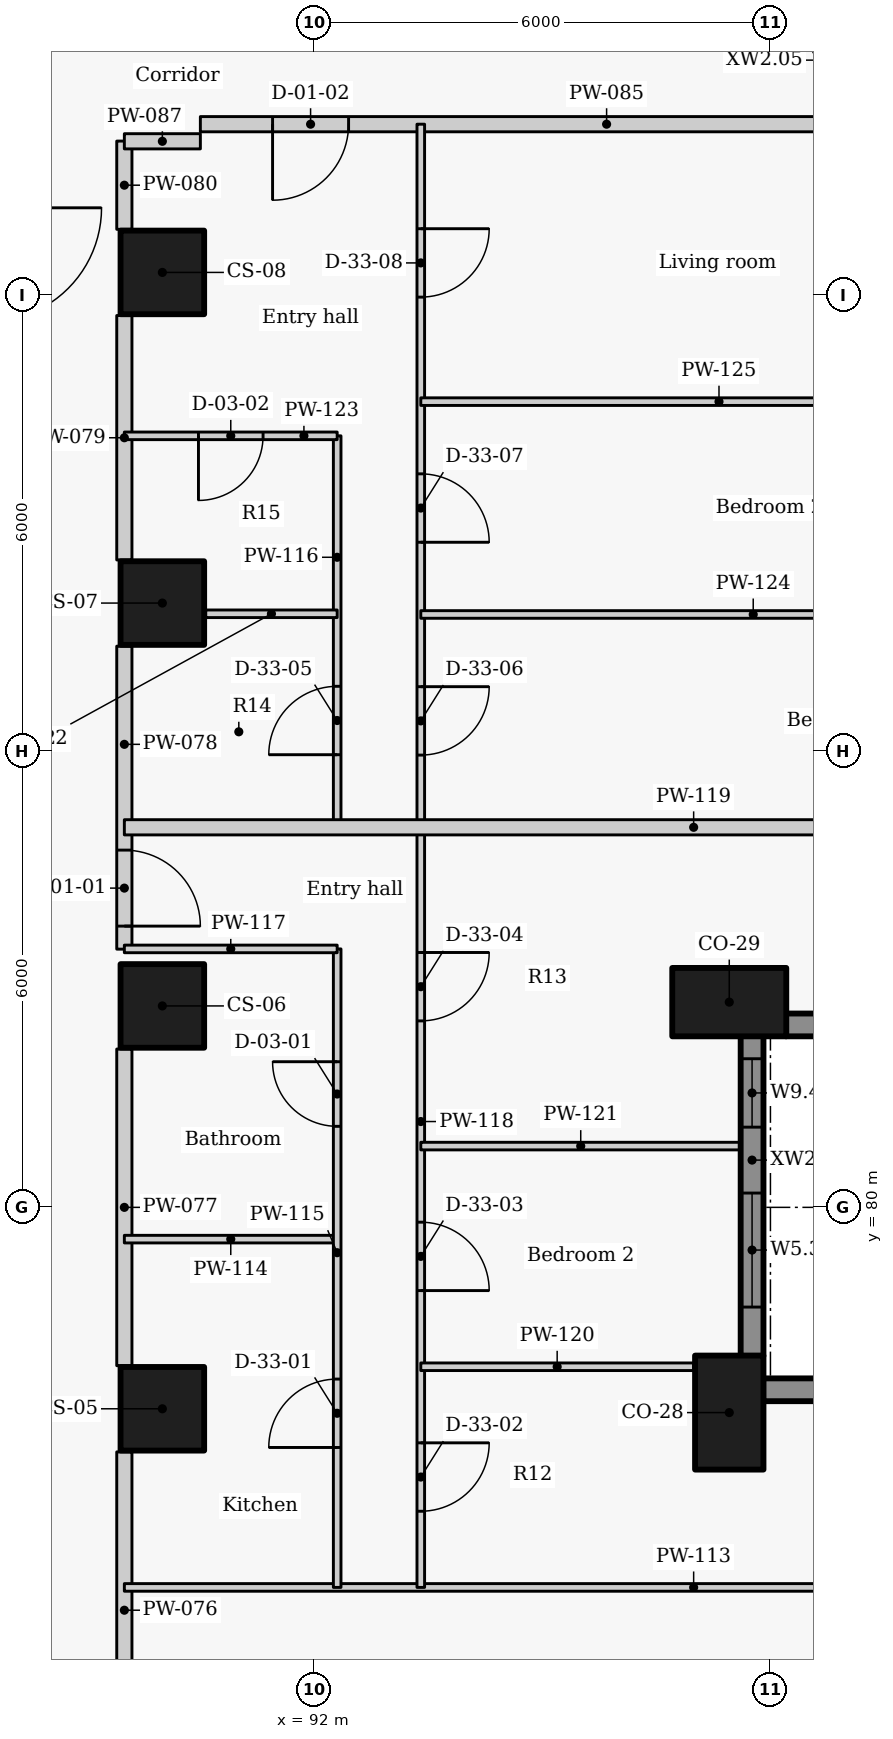
"""IFC4 building model, lengths in metres.
Left out: names, types, materials, properties, quantities, classifications, styles, units other than length and angle.
Written with IfcOpenShell. Run it as: python <this file> out.ifc"""

import sys

from ifc_helpers import new_model, si_unit, direction, frame, frame_2d, origin, origin_2d, place, context, subcontext, project, spatial, rectangle, extrude, element, fill, save


model = new_model("IFC4")
c1 = context("Model", 3, precision=1e-05, world=origin(), true_north=direction((0.0, 1.0)))
c2 = subcontext(c1, "Body", "Model", "MODEL_VIEW")
j1 = project(units=[si_unit("LENGTHUNIT", "METRE"), si_unit("PLANEANGLEUNIT", "RADIAN")], contexts=[c1])
p1 = place(None, origin())
s1 = spatial("IfcSite", under=j1, at=p1, CompositionType="ELEMENT")
p2 = place(p1, origin())
s2 = spatial("IfcBuilding", under=s1, at=p2, CompositionType="ELEMENT")
p3 = place(p2, frame((0.0, 0.0, 61.2)))
s3 = spatial("IfcBuildingStorey", under=s2, at=p3, CompositionType="ELEMENT", Elevation=61.2)
for number, where, z_axis, x_axis in (
    (1, (97.458, 77.3, 0.0), (0.0, 0.0, 1.0), (0.0, 1.0, 0.0)),
    (2, (97.458, 82.7, 0.0), (0.0, 0.0, 1.0), (1.0, 0.0, 0.0)),
):
    element("IfcColumn", number, at=place(p3, frame(where, z_axis=z_axis, x_axis=x_axis)), inside=s3, PredefinedType="COLUMN", context=c2, shape_type="SweptSolid", body=[
        extrude(rectangle(XDim=1.5, YDim=0.9, at=origin_2d()), origin(), (0.0, 0.0, 1.0), 3.3),
    ])
for number, where, z_axis, x_axis in (
    (3, (90.0, 77.35, 0.0), (0.0, 0.0, 1.0), (0.0, 1.0, 0.0)),
    (4, (90.0, 82.65, 0.0), (0.0, 0.0, 1.0), (0.0, 1.0, 0.0)),
    (5, (90.0, 87.95, 0.0), (0.0, 0.0, 1.0), (0.0, 1.0, 0.0)),
    (6, (90.0, 92.3, 0.0), (0.0, 0.0, 1.0), (0.0, 1.0, 0.0)),
):
    element("IfcColumn", number, at=place(p3, frame(where, z_axis=z_axis, x_axis=x_axis)), inside=s3, PredefinedType="COLUMN", context=c2, shape_type="SweptSolid", body=[
        extrude(rectangle(XDim=1.1, YDim=1.1, at=origin_2d()), origin(), (0.0, 0.0, 1.0), 3.3),
    ])
p4 = place(p3, frame((98.204, 82.4, 0.0), z_axis=(0.0, 0.0, 1.0), x_axis=(1.0, 0.0, 0.0)))
e7 = element("IfcWall", 7, at=p4, inside=s3, PredefinedType="SOLIDWALL", context=c2, shape_type="SweptSolid", body=[
    extrude(rectangle(XDim=3.873, YDim=0.3, at=frame_2d((1.936, 0.0))), origin(), (0.0, 0.0, 1.0), 2.425),
])
p5 = place(p4, frame((0.886, 0.0, 0.9)))
e8 = element("IfcOpeningElement", 8, at=p5, cuts=e7, PredefinedType="OPENING", context=c2, shape_type="SweptSolid", body=[
    extrude(rectangle(XDim=2.1, YDim=1.1, at=frame_2d((1.05, 0.55))), frame((0.0, 0.16, 0.0), z_axis=(0.0, -1.0, 0.0), x_axis=(1.0, 0.0, 0.0)), (0.0, 0.0, 1.0), 0.32),
])
p6 = place(p3, frame((100.195, 92.721, 0.0), z_axis=(0.0, 0.0, 1.0), x_axis=(-0.500001735503, 0.866024401789, 0.0)))
e9 = element("IfcWall", 9, at=p6, inside=s3, PredefinedType="SOLIDWALL", context=c2, shape_type="SweptSolid", body=[
    extrude(rectangle(XDim=3.834, YDim=0.3, at=frame_2d((1.917, 0.0))), origin(), (0.0, 0.0, 1.0), 2.425),
])
p7 = place(p6, frame((0.344, 0.0, 0.0)))
e10 = element("IfcOpeningElement", 10, at=p7, cuts=e9, PredefinedType="OPENING", context=c2, shape_type="SweptSolid", body=[
    extrude(rectangle(XDim=1.2, YDim=2.0, at=frame_2d((0.6, 1.0))), frame((0.0, 0.16, 0.0), z_axis=(0.0, -1.0, 0.0), x_axis=(1.0, 0.0, 0.0)), (0.0, 0.0, 1.0), 0.32),
])
p8 = place(p3, frame((102.077, 77.6, 0.0), z_axis=(0.0, 0.0, 1.0), x_axis=(-1.0, 0.0, 0.0)))
e11 = element("IfcWall", 11, at=p8, inside=s3, PredefinedType="SOLIDWALL", context=c2, shape_type="SweptSolid", body=[
    extrude(rectangle(XDim=4.173, YDim=0.3, at=frame_2d((2.086, 0.0))), origin(), (0.0, 0.0, 1.0), 2.425),
])
p9 = place(p8, frame((1.336, 0.0, 0.9)))
e12 = element("IfcOpeningElement", 12, at=p9, cuts=e11, PredefinedType="OPENING", context=c2, shape_type="SweptSolid", body=[
    extrude(rectangle(XDim=1.5, YDim=1.1, at=frame_2d((0.75, 0.55))), frame((0.0, 0.16, 0.0), z_axis=(0.0, -1.0, 0.0), x_axis=(1.0, 0.0, 0.0)), (0.0, 0.0, 1.0), 0.32),
])
p10 = place(p3, frame((97.758, 78.046, 0.0), z_axis=(0.0, 0.0, 1.0), x_axis=(0.0, 1.0, 0.0)))
e13 = element("IfcWall", 13, at=p10, inside=s3, PredefinedType="SOLIDWALL", context=c2, shape_type="SweptSolid", body=[
    extrude(rectangle(XDim=4.208, YDim=0.3, at=frame_2d((2.104, 0.0))), origin(), (0.0, 0.0, 1.0), 2.425),
])
p11 = place(p10, frame((0.642, 0.0, 0.9)))
e14 = element("IfcOpeningElement", 14, at=p11, cuts=e13, PredefinedType="OPENING", context=c2, shape_type="SweptSolid", body=[
    extrude(rectangle(XDim=1.5, YDim=1.1, at=frame_2d((0.75, 0.55))), frame((0.0, 0.16, 0.0), z_axis=(0.0, -1.0, 0.0), x_axis=(1.0, 0.0, 0.0)), (0.0, 0.0, 1.0), 0.32),
])
p12 = place(p10, frame((3.009, 0.0, 0.9)))
e15 = element("IfcOpeningElement", 15, at=p12, cuts=e13, PredefinedType="OPENING", context=c2, shape_type="SweptSolid", body=[
    extrude(rectangle(XDim=0.9, YDim=1.1, at=frame_2d((0.45, 0.55))), frame((0.0, 0.16, 0.0), z_axis=(0.0, -1.0, 0.0), x_axis=(1.0, 0.0, 0.0)), (0.0, 0.0, 1.0), 0.32),
])
for number, where, z_axis, x_axis in (
    (16, (89.5, 72.617, 0.0), (0.0, 0.0, 1.0), (0.0, 1.0, 0.0)),
    (17, (89.5, 77.917, 0.0), (0.0, 0.0, 1.0), (0.0, 1.0, 0.0)),
):
    element("IfcWall", number, at=place(p3, frame(where, z_axis=z_axis, x_axis=x_axis)), inside=s3, PredefinedType="PARTITIONING", context=c2, shape_type="SweptSolid", body=[
        extrude(rectangle(XDim=4.166, YDim=0.2, at=frame_2d((2.083, 0.0))), origin(), (0.0, 0.0, 1.0), 3.025),
    ])
p13 = place(p3, frame((89.5, 87.383, 0.0), z_axis=(0.0, 0.0, 1.0), x_axis=(0.0, -1.0, 0.0)))
e18 = element("IfcWall", 18, at=p13, inside=s3, PredefinedType="PARTITIONING", context=c2, shape_type="SweptSolid", body=[
    extrude(rectangle(XDim=3.986, YDim=0.2, at=frame_2d((1.993, 0.0))), origin(), (0.0, 0.0, 1.0), 3.025),
])
p14 = place(p13, frame((2.683, 0.0, 0.0)))
e19 = element("IfcOpeningElement", 19, at=p14, cuts=e18, PredefinedType="OPENING", context=c2, shape_type="SweptSolid", body=[
    extrude(rectangle(XDim=1.0, YDim=2.1, at=frame_2d((0.5, 1.05))), frame((0.0, 0.11, 0.0), z_axis=(0.0, -1.0, 0.0), x_axis=(1.0, 0.0, 0.0)), (0.0, 0.0, 1.0), 0.22),
])
p15 = place(p3, frame((89.5, 88.517, 0.0), z_axis=(0.0, 0.0, 1.0), x_axis=(0.0, 1.0, 0.0)))
e20 = element("IfcWall", 20, at=p15, inside=s3, PredefinedType="PARTITIONING", context=c2, shape_type="SweptSolid", body=[
    extrude(rectangle(XDim=3.216, YDim=0.2, at=frame_2d((1.608, 0.0))), origin(), (0.0, 0.0, 1.0), 3.025),
])
p16 = place(p3, frame((89.5, 92.867, 0.0), z_axis=(0.0, 0.0, 1.0), x_axis=(0.0, 1.0, 0.0)))
e21 = element("IfcWall", 21, at=p16, inside=s3, PredefinedType="PARTITIONING", context=c2, shape_type="SweptSolid", body=[
    extrude(rectangle(XDim=1.161, YDim=0.2, at=frame_2d((0.581, 0.0))), origin(), (0.0, 0.0, 1.0), 3.025),
])
p17 = place(p3, frame((99.139, 94.25, 0.0), z_axis=(0.0, 0.0, 1.0), x_axis=(-1.0, 0.0, 0.0)))
e22 = element("IfcWall", 22, at=p17, inside=s3, PredefinedType="PARTITIONING", context=c2, shape_type="SweptSolid", body=[
    extrude(rectangle(XDim=8.639, YDim=0.2, at=frame_2d((4.32, 0.0))), origin(), (0.0, 0.0, 1.0), 2.405),
])
p18 = place(p17, frame((6.689, 0.0, 0.0)))
e23 = element("IfcOpeningElement", 23, at=p18, cuts=e22, PredefinedType="OPENING", context=c2, shape_type="SweptSolid", body=[
    extrude(rectangle(XDim=1.0, YDim=2.1, at=frame_2d((0.5, 1.05))), frame((0.0, 0.11, 0.0), z_axis=(0.0, -1.0, 0.0), x_axis=(1.0, 0.0, 0.0)), (0.0, 0.0, 1.0), 0.22),
])
p19 = place(p3, frame((89.5, 94.025, 0.0), z_axis=(0.0, 0.0, 1.0), x_axis=(1.0, 0.0, 0.0)))
e24 = element("IfcWall", 24, at=p19, inside=s3, PredefinedType="PARTITIONING", context=c2, shape_type="SweptSolid", body=[
    extrude(rectangle(XDim=1.0, YDim=0.2, at=frame_2d((0.5, 0.0))), origin(), (0.0, 0.0, 1.0), 2.505),
])
p20 = place(p3, frame((89.5, 75.0, 0.0), z_axis=(0.0, 0.0, 1.0), x_axis=(1.0, 0.0, 0.0)))
e25 = element("IfcWall", 25, at=p20, inside=s3, PredefinedType="PARTITIONING", context=c2, shape_type="SweptSolid", body=[
    extrude(rectangle(XDim=14.979, YDim=0.1, at=frame_2d((7.49, 0.0))), origin(), (0.0, 0.0, 1.0), 2.405),
])
p21 = place(p3, frame((89.5, 79.582, 0.0), z_axis=(0.0, 0.0, 1.0), x_axis=(1.0, 0.0, 0.0)))
e26 = element("IfcWall", 26, at=p21, inside=s3, PredefinedType="PARTITIONING", context=c2, shape_type="SweptSolid", body=[
    extrude(rectangle(XDim=2.8, YDim=0.1, at=frame_2d((1.4, 0.0))), origin(), (0.0, 0.0, 1.0), 2.505),
])
p22 = place(p3, frame((92.3, 75.0, 0.0), z_axis=(0.0, 0.0, 1.0), x_axis=(0.0, 1.0, 0.0)))
e27 = element("IfcWall", 27, at=p22, inside=s3, PredefinedType="PARTITIONING", context=c2, shape_type="SweptSolid", body=[
    extrude(rectangle(XDim=8.4, YDim=0.1, at=frame_2d((4.2, 0.0))), origin(), (0.0, 0.0, 1.0), 3.025),
])
p23 = place(p22, frame((1.841, 0.0, 0.0)))
e28 = element("IfcOpeningElement", 28, at=p23, cuts=e27, PredefinedType="OPENING", context=c2, shape_type="SweptSolid", body=[
    extrude(rectangle(XDim=0.9, YDim=2.1, at=frame_2d((0.45, 1.05))), frame((0.0, 0.06, 0.0), z_axis=(0.0, -1.0, 0.0), x_axis=(1.0, 0.0, 0.0)), (0.0, 0.0, 1.0), 0.12),
])
p24 = place(p22, frame((6.066, 0.0, 0.0)))
e29 = element("IfcOpeningElement", 29, at=p24, cuts=e27, PredefinedType="OPENING", context=c2, shape_type="SweptSolid", body=[
    extrude(rectangle(XDim=0.85, YDim=2.1, at=frame_2d((0.425, 1.05))), frame((0.0, 0.06, 0.0), z_axis=(0.0, -1.0, 0.0), x_axis=(1.0, 0.0, 0.0)), (0.0, 0.0, 1.0), 0.12),
])
p25 = place(p3, frame((92.3, 85.0, 0.0), z_axis=(0.0, 0.0, 1.0), x_axis=(0.0, 1.0, 0.0)))
e30 = element("IfcWall", 30, at=p25, inside=s3, PredefinedType="PARTITIONING", context=c2, shape_type="SweptSolid", body=[
    extrude(rectangle(XDim=5.15, YDim=0.1, at=frame_2d((2.575, 0.0))), origin(), (0.0, 0.0, 1.0), 3.025),
])
p26 = place(p25, frame((0.955, 0.0, 0.0)))
e31 = element("IfcOpeningElement", 31, at=p26, cuts=e30, PredefinedType="OPENING", context=c2, shape_type="SweptSolid", body=[
    extrude(rectangle(XDim=0.9, YDim=2.1, at=frame_2d((0.45, 1.05))), frame((0.0, 0.06, 0.0), z_axis=(0.0, -1.0, 0.0), x_axis=(1.0, 0.0, 0.0)), (0.0, 0.0, 1.0), 0.12),
])
p27 = place(p3, frame((89.5, 83.4, 0.0), z_axis=(0.0, 0.0, 1.0), x_axis=(1.0, 0.0, 0.0)))
e32 = element("IfcWall", 32, at=p27, inside=s3, PredefinedType="PARTITIONING", context=c2, shape_type="SweptSolid", body=[
    extrude(rectangle(XDim=2.8, YDim=0.1, at=frame_2d((1.4, 0.0))), origin(), (0.0, 0.0, 1.0), 2.505),
])
p28 = place(p3, frame((93.4, 94.25, 0.0), z_axis=(0.0, 0.0, 1.0), x_axis=(0.0, -1.0, 0.0)))
e33 = element("IfcWall", 33, at=p28, inside=s3, PredefinedType="PARTITIONING", context=c2, shape_type="SweptSolid", body=[
    extrude(rectangle(XDim=19.25, YDim=0.1, at=frame_2d((9.625, 0.0))), origin(), (0.0, 0.0, 1.0), 3.025),
])
p29 = place(p28, frame((17.348, 0.0, 0.0)))
e34 = element("IfcOpeningElement", 34, at=p29, cuts=e33, PredefinedType="OPENING", context=c2, shape_type="SweptSolid", body=[
    extrude(rectangle(XDim=0.9, YDim=2.1, at=frame_2d((0.45, 1.05))), frame((0.0, 0.06, 0.0), z_axis=(0.0, -1.0, 0.0), x_axis=(1.0, 0.0, 0.0)), (0.0, 0.0, 1.0), 0.12),
])
p30 = place(p28, frame((14.445, 0.0, 0.0)))
e35 = element("IfcOpeningElement", 35, at=p30, cuts=e33, PredefinedType="OPENING", context=c2, shape_type="SweptSolid", body=[
    extrude(rectangle(XDim=0.9, YDim=2.1, at=frame_2d((0.45, 1.05))), frame((0.0, 0.06, 0.0), z_axis=(0.0, -1.0, 0.0), x_axis=(1.0, 0.0, 0.0)), (0.0, 0.0, 1.0), 0.12),
])
p31 = place(p28, frame((10.897, 0.0, 0.0)))
e36 = element("IfcOpeningElement", 36, at=p31, cuts=e33, PredefinedType="OPENING", context=c2, shape_type="SweptSolid", body=[
    extrude(rectangle(XDim=0.9, YDim=2.1, at=frame_2d((0.45, 1.05))), frame((0.0, 0.06, 0.0), z_axis=(0.0, -1.0, 0.0), x_axis=(1.0, 0.0, 0.0)), (0.0, 0.0, 1.0), 0.12),
])
p32 = place(p28, frame((7.4, 0.0, 0.0)))
e37 = element("IfcOpeningElement", 37, at=p32, cuts=e33, PredefinedType="OPENING", context=c2, shape_type="SweptSolid", body=[
    extrude(rectangle(XDim=0.9, YDim=2.1, at=frame_2d((0.45, 1.05))), frame((0.0, 0.06, 0.0), z_axis=(0.0, -1.0, 0.0), x_axis=(1.0, 0.0, 0.0)), (0.0, 0.0, 1.0), 0.12),
])
p33 = place(p28, frame((4.6, 0.0, 0.0)))
e38 = element("IfcOpeningElement", 38, at=p33, cuts=e33, PredefinedType="OPENING", context=c2, shape_type="SweptSolid", body=[
    extrude(rectangle(XDim=0.9, YDim=2.1, at=frame_2d((0.45, 1.05))), frame((0.0, 0.06, 0.0), z_axis=(0.0, -1.0, 0.0), x_axis=(1.0, 0.0, 0.0)), (0.0, 0.0, 1.0), 0.12),
])
p34 = place(p28, frame((1.375, 0.0, 0.0)))
e39 = element("IfcOpeningElement", 39, at=p34, cuts=e33, PredefinedType="OPENING", context=c2, shape_type="SweptSolid", body=[
    extrude(rectangle(XDim=0.9, YDim=2.1, at=frame_2d((0.45, 1.05))), frame((0.0, 0.06, 0.0), z_axis=(0.0, -1.0, 0.0), x_axis=(1.0, 0.0, 0.0)), (0.0, 0.0, 1.0), 0.12),
])
p35 = place(p3, frame((89.5, 85.0, 0.0), z_axis=(0.0, 0.0, 1.0), x_axis=(1.0, 0.0, 0.0)))
e40 = element("IfcWall", 40, at=p35, inside=s3, PredefinedType="PARTITIONING", context=c2, shape_type="SweptSolid", body=[
    extrude(rectangle(XDim=14.979, YDim=0.2, at=frame_2d((7.49, 0.0))), origin(), (0.0, 0.0, 1.0), 2.405),
])
p36 = place(p3, frame((93.4, 77.903, 0.0), z_axis=(0.0, 0.0, 1.0), x_axis=(1.0, 0.0, 0.0)))
e41 = element("IfcWall", 41, at=p36, inside=s3, PredefinedType="PARTITIONING", context=c2, shape_type="SweptSolid", body=[
    extrude(rectangle(XDim=3.588, YDim=0.1, at=frame_2d((1.794, 0.0))), origin(), (0.0, 0.0, 1.0), 3.025),
])
p37 = place(p3, frame((93.4, 80.806, 0.0), z_axis=(0.0, 0.0, 1.0), x_axis=(1.0, 0.0, 0.0)))
e42 = element("IfcWall", 42, at=p37, inside=s3, PredefinedType="PARTITIONING", context=c2, shape_type="SweptSolid", body=[
    extrude(rectangle(XDim=4.208, YDim=0.1, at=frame_2d((2.104, 0.0))), origin(), (0.0, 0.0, 1.0), 2.405),
])
p38 = place(p3, frame((90.57, 87.809, 0.0), z_axis=(0.0, 0.0, 1.0), x_axis=(1.0, 0.0, 0.0)))
e43 = element("IfcWall", 43, at=p38, inside=s3, PredefinedType="PARTITIONING", context=c2, shape_type="SweptSolid", body=[
    extrude(rectangle(XDim=1.73, YDim=0.1, at=frame_2d((0.865, 0.0))), origin(), (0.0, 0.0, 1.0), 3.025),
])
p39 = place(p3, frame((92.3, 90.15, 0.0), z_axis=(0.0, 0.0, 1.0), x_axis=(-1.0, 0.0, 0.0)))
e44 = element("IfcWall", 44, at=p39, inside=s3, PredefinedType="PARTITIONING", context=c2, shape_type="SweptSolid", body=[
    extrude(rectangle(XDim=2.8, YDim=0.1, at=frame_2d((1.4, 0.0))), origin(), (0.0, 0.0, 1.0), 2.505),
])
p40 = place(p39, frame((0.975, 0.0, 0.0)))
e45 = element("IfcOpeningElement", 45, at=p40, cuts=e44, PredefinedType="OPENING", context=c2, shape_type="SweptSolid", body=[
    extrude(rectangle(XDim=0.85, YDim=2.1, at=frame_2d((0.425, 1.05))), frame((0.0, 0.06, 0.0), z_axis=(0.0, -1.0, 0.0), x_axis=(1.0, 0.0, 0.0)), (0.0, 0.0, 1.0), 0.12),
])
p41 = place(p3, frame((93.4, 87.8, 0.0), z_axis=(0.0, 0.0, 1.0), x_axis=(1.0, 0.0, 0.0)))
e46 = element("IfcWall", 46, at=p41, inside=s3, PredefinedType="PARTITIONING", context=c2, shape_type="SweptSolid", body=[
    extrude(rectangle(XDim=8.747, YDim=0.1, at=frame_2d((4.374, 0.0))), origin(), (0.0, 0.0, 1.0), 3.025),
])
p42 = place(p3, frame((93.4, 90.6, 0.0), z_axis=(0.0, 0.0, 1.0), x_axis=(1.0, 0.0, 0.0)))
e47 = element("IfcWall", 47, at=p42, inside=s3, PredefinedType="PARTITIONING", context=c2, shape_type="SweptSolid", body=[
    extrude(rectangle(XDim=7.846, YDim=0.1, at=frame_2d((3.923, 0.0))), origin(), (0.0, 0.0, 1.0), 2.405),
])
p43 = place(p11, origin())
e48 = element("IfcWindow", 48, at=p43, inside=s3, PartitioningType="SINGLE_PANEL", PredefinedType="WINDOW", context=c2, shape_type="SweptSolid", body=[
    extrude(rectangle(XDim=1.5, YDim=1.1, at=frame_2d((0.75, 0.55))), frame((0.0, 0.03, 0.0), z_axis=(0.0, -1.0, 0.0), x_axis=(1.0, 0.0, 0.0)), (0.0, 0.0, 1.0), 0.06),
])
fill(e14, e48)
p44 = place(p12, origin())
e49 = element("IfcWindow", 49, at=p44, inside=s3, PartitioningType="SINGLE_PANEL", PredefinedType="WINDOW", context=c2, shape_type="SweptSolid", body=[
    extrude(rectangle(XDim=0.9, YDim=1.1, at=frame_2d((0.45, 0.55))), frame((0.0, 0.03, 0.0), z_axis=(0.0, -1.0, 0.0), x_axis=(1.0, 0.0, 0.0)), (0.0, 0.0, 1.0), 0.06),
])
fill(e15, e49)
p45 = place(p14, origin())
e50 = element("IfcDoor", 50, at=p45, inside=s3, OperationType="SINGLE_SWING_RIGHT", PredefinedType="DOOR", context=c2, shape_type="SweptSolid", body=[
    extrude(rectangle(XDim=1.0, YDim=2.1, at=frame_2d((0.5, 1.05))), frame((0.0, 0.025, 0.0), z_axis=(0.0, -1.0, 0.0), x_axis=(1.0, 0.0, 0.0)), (0.0, 0.0, 1.0), 0.05),
])
fill(e19, e50)
p46 = place(p23, origin())
e51 = element("IfcDoor", 51, at=p46, inside=s3, OperationType="SINGLE_SWING_LEFT", PredefinedType="DOOR", context=c2, shape_type="SweptSolid", body=[
    extrude(rectangle(XDim=0.9, YDim=2.1, at=frame_2d((0.45, 1.05))), frame((0.0, 0.025, 0.0), z_axis=(0.0, -1.0, 0.0), x_axis=(1.0, 0.0, 0.0)), (0.0, 0.0, 1.0), 0.05),
])
fill(e28, e51)
p47 = place(p24, origin())
e52 = element("IfcDoor", 52, at=p47, inside=s3, OperationType="SINGLE_SWING_RIGHT", PredefinedType="DOOR", context=c2, shape_type="SweptSolid", body=[
    extrude(rectangle(XDim=0.85, YDim=2.1, at=frame_2d((0.425, 1.05))), frame((0.0, 0.025, 0.0), z_axis=(0.0, -1.0, 0.0), x_axis=(1.0, 0.0, 0.0)), (0.0, 0.0, 1.0), 0.05),
])
fill(e29, e52)
p48 = place(p29, origin())
e53 = element("IfcDoor", 53, at=p48, inside=s3, OperationType="SINGLE_SWING_LEFT", PredefinedType="DOOR", context=c2, shape_type="SweptSolid", body=[
    extrude(rectangle(XDim=0.9, YDim=2.1, at=frame_2d((0.45, 1.05))), frame((0.0, 0.025, 0.0), z_axis=(0.0, -1.0, 0.0), x_axis=(1.0, 0.0, 0.0)), (0.0, 0.0, 1.0), 0.05),
])
fill(e34, e53)
p49 = place(p30, origin())
e54 = element("IfcDoor", 54, at=p49, inside=s3, OperationType="SINGLE_SWING_RIGHT", PredefinedType="DOOR", context=c2, shape_type="SweptSolid", body=[
    extrude(rectangle(XDim=0.9, YDim=2.1, at=frame_2d((0.45, 1.05))), frame((0.0, 0.025, 0.0), z_axis=(0.0, -1.0, 0.0), x_axis=(1.0, 0.0, 0.0)), (0.0, 0.0, 1.0), 0.05),
])
fill(e35, e54)
p50 = place(p31, origin())
e55 = element("IfcDoor", 55, at=p50, inside=s3, OperationType="SINGLE_SWING_LEFT", PredefinedType="DOOR", context=c2, shape_type="SweptSolid", body=[
    extrude(rectangle(XDim=0.9, YDim=2.1, at=frame_2d((0.45, 1.05))), frame((0.0, 0.025, 0.0), z_axis=(0.0, -1.0, 0.0), x_axis=(1.0, 0.0, 0.0)), (0.0, 0.0, 1.0), 0.05),
])
fill(e36, e55)
p51 = place(p18, origin())
e56 = element("IfcDoor", 56, at=p51, inside=s3, OperationType="SINGLE_SWING_RIGHT", PredefinedType="DOOR", context=c2, shape_type="SweptSolid", body=[
    extrude(rectangle(XDim=1.0, YDim=2.1, at=frame_2d((0.5, 1.05))), frame((0.0, 0.025, 0.0), z_axis=(0.0, -1.0, 0.0), x_axis=(1.0, 0.0, 0.0)), (0.0, 0.0, 1.0), 0.05),
])
fill(e23, e56)
p52 = place(p26, origin())
e57 = element("IfcDoor", 57, at=p52, inside=s3, OperationType="SINGLE_SWING_LEFT", PredefinedType="DOOR", context=c2, shape_type="SweptSolid", body=[
    extrude(rectangle(XDim=0.9, YDim=2.1, at=frame_2d((0.45, 1.05))), frame((0.0, 0.025, 0.0), z_axis=(0.0, -1.0, 0.0), x_axis=(1.0, 0.0, 0.0)), (0.0, 0.0, 1.0), 0.05),
])
fill(e31, e57)
p53 = place(p40, origin())
e58 = element("IfcDoor", 58, at=p53, inside=s3, OperationType="SINGLE_SWING_RIGHT", PredefinedType="DOOR", context=c2, shape_type="SweptSolid", body=[
    extrude(rectangle(XDim=0.85, YDim=2.1, at=frame_2d((0.425, 1.05))), frame((0.0, 0.025, 0.0), z_axis=(0.0, -1.0, 0.0), x_axis=(1.0, 0.0, 0.0)), (0.0, 0.0, 1.0), 0.05),
])
fill(e45, e58)
p54 = place(p32, origin())
e59 = element("IfcDoor", 59, at=p54, inside=s3, OperationType="SINGLE_SWING_LEFT", PredefinedType="DOOR", context=c2, shape_type="SweptSolid", body=[
    extrude(rectangle(XDim=0.9, YDim=2.1, at=frame_2d((0.45, 1.05))), frame((0.0, 0.025, 0.0), z_axis=(0.0, -1.0, 0.0), x_axis=(1.0, 0.0, 0.0)), (0.0, 0.0, 1.0), 0.05),
])
fill(e37, e59)
p55 = place(p33, origin())
e60 = element("IfcDoor", 60, at=p55, inside=s3, OperationType="SINGLE_SWING_RIGHT", PredefinedType="DOOR", context=c2, shape_type="SweptSolid", body=[
    extrude(rectangle(XDim=0.9, YDim=2.1, at=frame_2d((0.45, 1.05))), frame((0.0, 0.025, 0.0), z_axis=(0.0, -1.0, 0.0), x_axis=(1.0, 0.0, 0.0)), (0.0, 0.0, 1.0), 0.05),
])
fill(e38, e60)
p56 = place(p34, origin())
e61 = element("IfcDoor", 61, at=p56, inside=s3, OperationType="SINGLE_SWING_LEFT", PredefinedType="DOOR", context=c2, shape_type="SweptSolid", body=[
    extrude(rectangle(XDim=0.9, YDim=2.1, at=frame_2d((0.45, 1.05))), frame((0.0, 0.025, 0.0), z_axis=(0.0, -1.0, 0.0), x_axis=(1.0, 0.0, 0.0)), (0.0, 0.0, 1.0), 0.05),
])
fill(e39, e61)
save(model, sys.argv[1])
